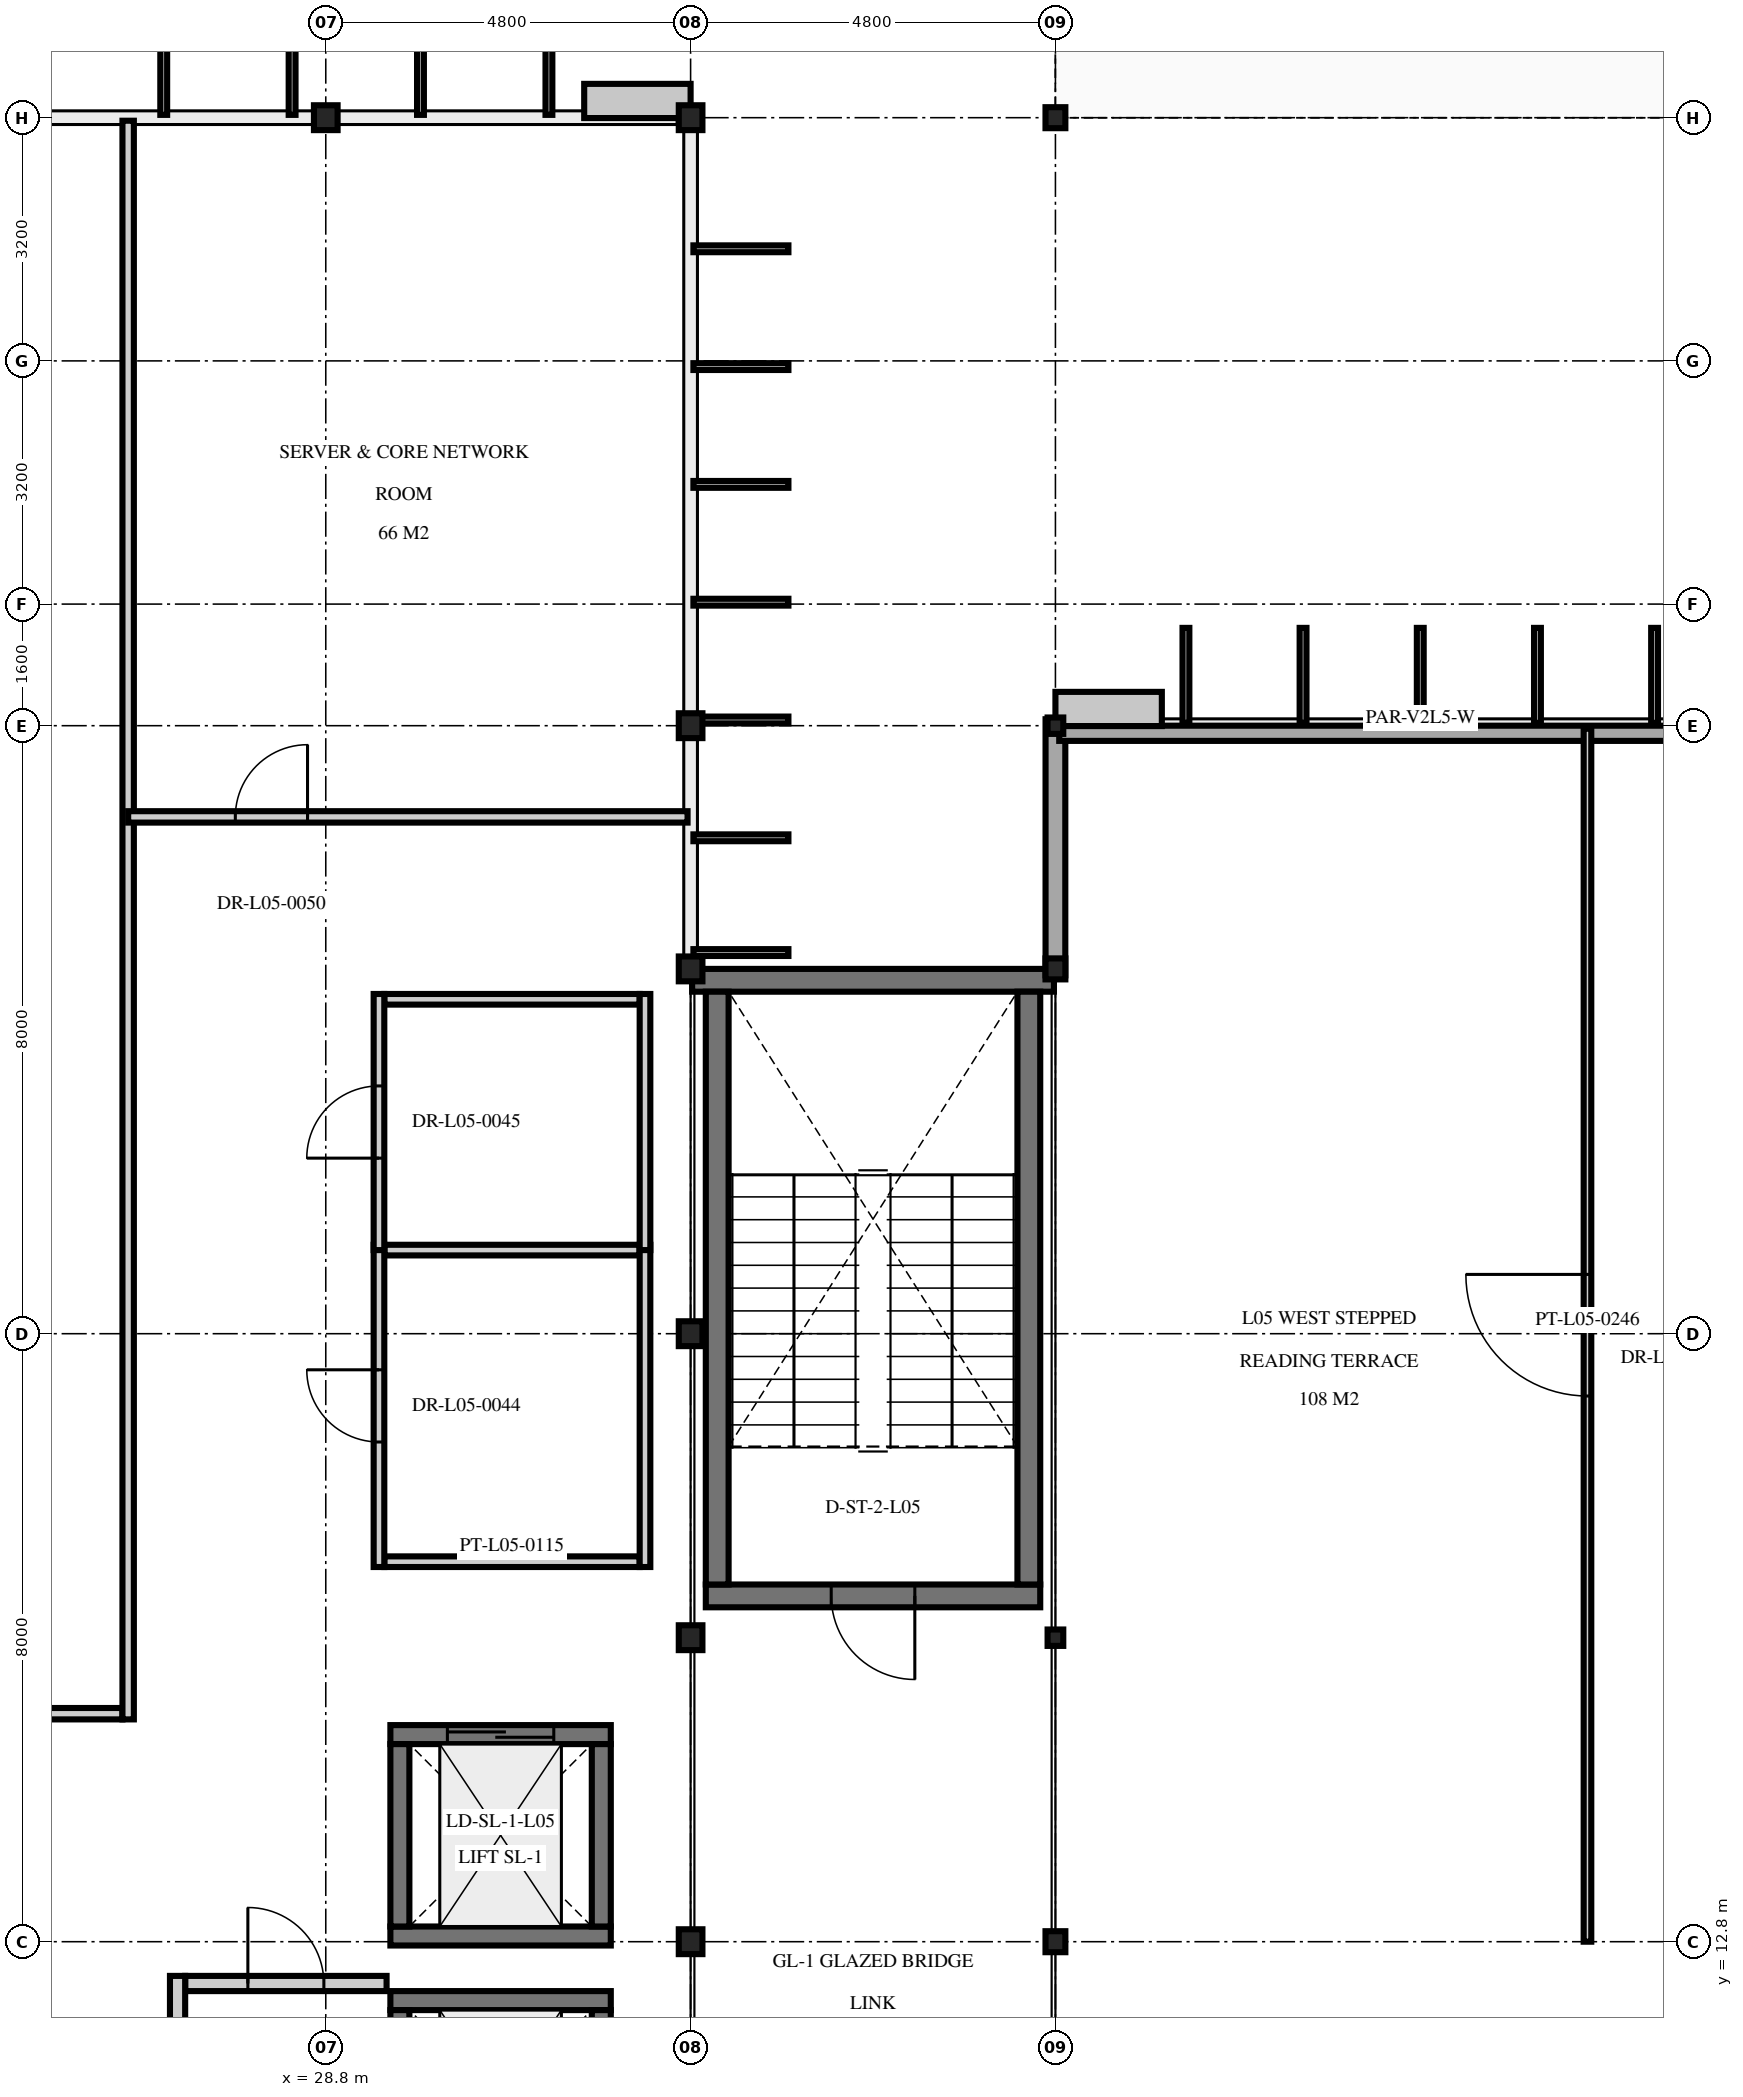
"""IFC4 building model, lengths in metres.
Left out: names, types, materials, properties, quantities, classifications, styles, units other than length and angle.
Written with IfcOpenShell. Run it as: python <this file> out.ifc"""

import sys

from ifc_helpers import new_model, si_unit, direction, frame, frame_2d, origin, origin_2d, place, context, subcontext, project, spatial, rectangle, i_section, extrude, element, fill, save


model = new_model("IFC4")
c1 = context("Model", 3, precision=1e-05, world=origin(), true_north=direction((0.0, 1.0)))
c2 = subcontext(c1, "Body", "Model", "MODEL_VIEW")
j1 = project(units=[si_unit("LENGTHUNIT", "METRE"), si_unit("PLANEANGLEUNIT", "RADIAN")], contexts=[c1])
p1 = place(None, origin())
s1 = spatial("IfcSite", under=j1, at=p1, CompositionType="ELEMENT")
p2 = place(p1, origin())
s2 = spatial("IfcBuilding", under=s1, at=p2, CompositionType="ELEMENT")
p3 = place(p2, frame((0.0, 0.0, 23.1)))
s3 = spatial("IfcBuildingStorey", under=s2, at=p3, CompositionType="ELEMENT", Elevation=23.1)
for number, where, z_axis, x_axis in (
    (1, (28.8, 36.8, 0.0), (0.0, 0.0, 1.0), (1.0, 0.0, 0.0)),
    (2, (33.6, 36.8, 0.0), (0.0, 0.0, 1.0), (1.0, 0.0, 0.0)),
    (3, (33.6, 12.8, 0.0), (0.0, 0.0, 1.0), (1.0, 0.0, 0.0)),
    (4, (33.6, 16.8, 0.0), (0.0, 0.0, 1.0), (1.0, 0.0, 0.0)),
    (5, (33.6, 20.8, 0.0), (0.0, 0.0, 1.0), (1.0, 0.0, 0.0)),
    (6, (33.6, 25.6, 0.0), (0.0, 0.0, 1.0), (1.0, 0.0, 0.0)),
    (7, (33.6, 28.8, 0.0), (0.0, 0.0, 1.0), (1.0, 0.0, 0.0)),
):
    element("IfcColumn", number, at=place(p3, frame(where, z_axis=z_axis, x_axis=x_axis)), inside=s3, PredefinedType="COLUMN", context=c2, shape_type="SweptSolid", body=[
        extrude(i_section(OverallWidth=0.311, OverallDepth=0.327, WebThickness=0.016, FlangeThickness=0.025, at=origin_2d()), origin(), (0.0, 0.0, 1.0), 4.5),
    ])
for number, where, z_axis, x_axis in (
    (8, (38.4, 12.8, 0.0), (0.0, 0.0, 1.0), (1.0, 0.0, 0.0)),
    (9, (38.4, 25.6, 0.0), (0.0, 0.0, 1.0), (1.0, 0.0, 0.0)),
):
    element("IfcColumn", number, at=place(p3, frame(where, z_axis=z_axis, x_axis=x_axis)), inside=s3, PredefinedType="COLUMN", context=c2, shape_type="SweptSolid", body=[
        extrude(i_section(OverallWidth=0.261, OverallDepth=0.276, WebThickness=0.015, FlangeThickness=0.025, at=origin_2d()), origin(), (0.0, 0.0, 1.0), 4.5),
    ])
p4 = place(p3, frame((38.4, 36.8, 0.0), z_axis=(0.0, 0.0, 1.0), x_axis=(1.0, 0.0, 0.0)))
e10 = element("IfcColumn", 10, at=p4, inside=s3, PredefinedType="COLUMN", context=c2, shape_type="SweptSolid", body=[
    extrude(i_section(OverallWidth=0.261, OverallDepth=0.276, WebThickness=0.015, FlangeThickness=0.025, at=origin_2d()), origin(), (0.0, 0.0, 1.0), 4.31),
])
for number, where, z_axis, x_axis in (
    (11, (38.4, 28.8, 0.0), (0.0, 0.0, 1.0), (1.0, 0.0, 0.0)),
    (12, (38.4, 16.8, 0.0), (0.0, 0.0, 1.0), (1.0, 0.0, 0.0)),
):
    element("IfcColumn", number, at=place(p3, frame(where, z_axis=z_axis, x_axis=x_axis)), inside=s3, PredefinedType="COLUMN", context=c2, shape_type="SweptSolid", body=[
        extrude(i_section(OverallWidth=0.206, OverallDepth=0.216, WebThickness=0.01, FlangeThickness=0.017, at=origin_2d()), origin(), (0.0, 0.0, 1.0), 4.5),
    ])
p5 = place(p3, frame((38.2, 17.35, 0.0), z_axis=(0.0, 0.0, 1.0), x_axis=(-1.0, 0.0, 0.0)))
e13 = element("IfcWall", 13, at=p5, inside=s3, PredefinedType="SHEAR", context=c2, shape_type="SweptSolid", body=[
    extrude(rectangle(XDim=4.4, YDim=0.3, at=frame_2d((2.2, 0.0))), origin(), (0.0, 0.0, 1.0), 4.29),
])
p6 = place(p5, frame((1.65, 0.0, 0.0)))
e14 = element("IfcOpeningElement", 14, at=p6, cuts=e13, PredefinedType="OPENING", context=c2, shape_type="SweptSolid", body=[
    extrude(rectangle(XDim=1.1, YDim=2.2, at=frame_2d((0.55, 1.1))), frame((0.0, 0.16, 0.0), z_axis=(0.0, -1.0, 0.0), x_axis=(1.0, 0.0, 0.0)), (0.0, 0.0, 1.0), 0.32),
])
p7 = place(p3, frame((33.62, 25.45, 0.0), z_axis=(0.0, 0.0, 1.0), x_axis=(1.0, 0.0, 0.0)))
e15 = element("IfcWall", 15, at=p7, inside=s3, PredefinedType="SHEAR", context=c2, shape_type="SweptSolid", body=[
    extrude(rectangle(XDim=4.76, YDim=0.3, at=frame_2d((2.38, 0.0))), origin(), (0.0, 0.0, 1.0), 4.29),
])
for number, where, z_axis, x_axis in (
    (16, (33.95, 17.5, 0.0), (0.0, 0.0, 1.0), (0.0, 1.0, 0.0)),
    (17, (38.05, 25.3, 0.0), (0.0, 0.0, 1.0), (0.0, -1.0, 0.0)),
):
    element("IfcWall", number, at=place(p3, frame(where, z_axis=z_axis, x_axis=x_axis)), inside=s3, PredefinedType="SHEAR", context=c2, shape_type="SweptSolid", body=[
        extrude(rectangle(XDim=7.8, YDim=0.3, at=frame_2d((3.9, 0.0))), origin(), (0.0, 0.0, 1.0), 4.29),
    ])
p8 = place(p3, frame((29.65, 12.025, 0.0), z_axis=(0.0, 0.0, 1.0), x_axis=(1.0, 0.0, 0.0)))
e18 = element("IfcWall", 18, at=p8, inside=s3, PredefinedType="SHEAR", context=c2, shape_type="SweptSolid", body=[
    extrude(rectangle(XDim=2.9, YDim=0.25, at=frame_2d((1.45, 0.0))), origin(), (0.0, 0.0, 1.0), 4.29),
])
p9 = place(p3, frame((29.775, 9.5, 0.0), z_axis=(0.0, 0.0, 1.0), x_axis=(0.0, 1.0, 0.0)))
e19 = element("IfcWall", 19, at=p9, inside=s3, PredefinedType="SHEAR", context=c2, shape_type="SweptSolid", body=[
    extrude(rectangle(XDim=2.4, YDim=0.25, at=frame_2d((1.2, 0.0))), origin(), (0.0, 0.0, 1.0), 4.29),
])
p10 = place(p9, frame((0.5, 0.0, 0.0)))
e20 = element("IfcOpeningElement", 20, at=p10, cuts=e19, PredefinedType="OPENING", context=c2, shape_type="SweptSolid", body=[
    extrude(rectangle(XDim=1.4, YDim=2.2, at=frame_2d((0.7, 1.1))), frame((0.0, 0.135, 0.0), z_axis=(0.0, -1.0, 0.0), x_axis=(1.0, 0.0, 0.0)), (0.0, 0.0, 1.0), 0.27),
])
p11 = place(p3, frame((32.425, 11.9, 0.0), z_axis=(0.0, 0.0, 1.0), x_axis=(0.0, -1.0, 0.0)))
e21 = element("IfcWall", 21, at=p11, inside=s3, PredefinedType="SHEAR", context=c2, shape_type="SweptSolid", body=[
    extrude(rectangle(XDim=2.4, YDim=0.25, at=frame_2d((1.2, 0.0))), origin(), (0.0, 0.0, 1.0), 4.29),
])
p12 = place(p3, frame((32.55, 12.875, 0.0), z_axis=(0.0, 0.0, 1.0), x_axis=(-1.0, 0.0, 0.0)))
e22 = element("IfcWall", 22, at=p12, inside=s3, PredefinedType="SHEAR", context=c2, shape_type="SweptSolid", body=[
    extrude(rectangle(XDim=2.9, YDim=0.25, at=frame_2d((1.45, 0.0))), origin(), (0.0, 0.0, 1.0), 4.29),
])
p13 = place(p3, frame((29.65, 15.525, 0.0), z_axis=(0.0, 0.0, 1.0), x_axis=(1.0, 0.0, 0.0)))
e23 = element("IfcWall", 23, at=p13, inside=s3, PredefinedType="SHEAR", context=c2, shape_type="SweptSolid", body=[
    extrude(rectangle(XDim=2.9, YDim=0.25, at=frame_2d((1.45, 0.0))), origin(), (0.0, 0.0, 1.0), 4.29),
])
p14 = place(p13, frame((0.75, 0.0, 0.0)))
e24 = element("IfcOpeningElement", 24, at=p14, cuts=e23, PredefinedType="OPENING", context=c2, shape_type="SweptSolid", body=[
    extrude(rectangle(XDim=1.4, YDim=2.2, at=frame_2d((0.7, 1.1))), frame((0.0, 0.135, 0.0), z_axis=(0.0, -1.0, 0.0), x_axis=(1.0, 0.0, 0.0)), (0.0, 0.0, 1.0), 0.27),
])
for number, where, z_axis, x_axis in (
    (25, (29.775, 13.0, 0.0), (0.0, 0.0, 1.0), (0.0, 1.0, 0.0)),
    (26, (32.425, 15.4, 0.0), (0.0, 0.0, 1.0), (0.0, -1.0, 0.0)),
):
    element("IfcWall", number, at=place(p3, frame(where, z_axis=z_axis, x_axis=x_axis)), inside=s3, PredefinedType="SHEAR", context=c2, shape_type="SweptSolid", body=[
        extrude(rectangle(XDim=2.4, YDim=0.25, at=frame_2d((1.2, 0.0))), origin(), (0.0, 0.0, 1.0), 4.29),
    ])
p15 = place(p3, frame((38.4, 25.515, 0.0), z_axis=(0.0, 0.0, 1.0), x_axis=(0.0, 1.0, 0.0)))
e27 = element("IfcWall", 27, at=p15, inside=s3, PredefinedType="SOLIDWALL", context=c2, shape_type="SweptSolid", body=[
    extrude(rectangle(XDim=3.37, YDim=0.26, at=frame_2d((1.685, 0.0))), origin(), (0.0, 0.0, 1.0), 3.859),
])
p16 = place(p3, frame((38.45, 28.7, 0.0), z_axis=(0.0, 0.0, 1.0), x_axis=(1.0, 0.0, 0.0)))
e28 = element("IfcWall", 28, at=p16, inside=s3, PredefinedType="PARAPET", context=c2, shape_type="SweptSolid", body=[
    extrude(rectangle(XDim=9.5, YDim=0.2, at=frame_2d((4.75, 0.0))), origin(), (0.0, 0.0, 1.0), 1.1),
])
p17 = place(p3, frame((26.95, 12.25, 0.0), z_axis=(0.0, 0.0, 1.0), x_axis=(1.0, 0.0, 0.0)))
e29 = element("IfcWall", 29, at=p17, inside=s3, PredefinedType="PARTITIONING", context=c2, shape_type="SweptSolid", body=[
    extrude(rectangle(XDim=2.65, YDim=0.2, at=frame_2d((1.325, 0.0))), origin(), (0.0, 0.0, 1.0), 4.29),
])
p18 = place(p17, frame((0.825, 0.0, 0.0)))
e30 = element("IfcOpeningElement", 30, at=p18, cuts=e29, PredefinedType="OPENING", context=c2, shape_type="SweptSolid", body=[
    extrude(rectangle(XDim=1.0, YDim=2.2, at=frame_2d((0.5, 1.1))), frame((0.0, 0.11, 0.0), z_axis=(0.0, -1.0, 0.0), x_axis=(1.0, 0.0, 0.0)), (0.0, 0.0, 1.0), 0.22),
])
p19 = place(p3, frame((26.85, 9.25, 0.0), z_axis=(0.0, 0.0, 1.0), x_axis=(0.0, 1.0, 0.0)))
e31 = element("IfcWall", 31, at=p19, inside=s3, PredefinedType="PARTITIONING", context=c2, shape_type="SweptSolid", body=[
    extrude(rectangle(XDim=3.1, YDim=0.2, at=frame_2d((1.55, 0.0))), origin(), (0.0, 0.0, 1.0), 4.29),
])
for number, where, z_axis, x_axis in (
    (32, (29.57, 17.8, 0.0), (0.0, 0.0, 1.0), (1.0, 0.0, 0.0)),
    (33, (29.57, 21.9, 0.0), (0.0, 0.0, 1.0), (1.0, 0.0, 0.0)),
):
    element("IfcWall", number, at=place(p3, frame(where, z_axis=z_axis, x_axis=x_axis)), inside=s3, PredefinedType="PARTITIONING", context=c2, shape_type="SweptSolid", body=[
        extrude(rectangle(XDim=3.36, YDim=0.14, at=frame_2d((1.68, 0.0))), origin(), (0.0, 0.0, 1.0), 3.995),
    ])
p20 = place(p3, frame((29.5, 17.73, 0.0), z_axis=(0.0, 0.0, 1.0), x_axis=(0.0, 1.0, 0.0)))
e34 = element("IfcWall", 34, at=p20, inside=s3, PredefinedType="PARTITIONING", context=c2, shape_type="SweptSolid", body=[
    extrude(rectangle(XDim=4.24, YDim=0.14, at=frame_2d((2.12, 0.0))), origin(), (0.0, 0.0, 1.0), 3.653),
])
p21 = place(p20, frame((1.645, 0.0, 0.0)))
e35 = element("IfcOpeningElement", 35, at=p21, cuts=e34, PredefinedType="OPENING", context=c2, shape_type="SweptSolid", body=[
    extrude(rectangle(XDim=0.95, YDim=2.1, at=frame_2d((0.475, 1.05))), frame((0.0, 0.08, 0.0), z_axis=(0.0, -1.0, 0.0), x_axis=(1.0, 0.0, 0.0)), (0.0, 0.0, 1.0), 0.16),
])
p22 = place(p3, frame((33.0, 17.73, 0.0), z_axis=(0.0, 0.0, 1.0), x_axis=(0.0, 1.0, 0.0)))
e36 = element("IfcWall", 36, at=p22, inside=s3, PredefinedType="PARTITIONING", context=c2, shape_type="SweptSolid", body=[
    extrude(rectangle(XDim=4.24, YDim=0.14, at=frame_2d((2.12, 0.0))), origin(), (0.0, 0.0, 1.0), 3.653),
])
p23 = place(p3, frame((29.57, 25.2, 0.0), z_axis=(0.0, 0.0, 1.0), x_axis=(1.0, 0.0, 0.0)))
e37 = element("IfcWall", 37, at=p23, inside=s3, PredefinedType="PARTITIONING", context=c2, shape_type="SweptSolid", body=[
    extrude(rectangle(XDim=3.36, YDim=0.14, at=frame_2d((1.68, 0.0))), origin(), (0.0, 0.0, 1.0), 3.995),
])
p24 = place(p3, frame((29.5, 21.9, 0.0), z_axis=(0.0, 0.0, 1.0), x_axis=(0.0, 1.0, 0.0)))
e38 = element("IfcWall", 38, at=p24, inside=s3, PredefinedType="PARTITIONING", context=c2, shape_type="SweptSolid", body=[
    extrude(rectangle(XDim=3.37, YDim=0.14, at=frame_2d((1.685, 0.0))), origin(), (0.0, 0.0, 1.0), 4.29),
])
p25 = place(p24, frame((1.21, 0.0, 0.0)))
e39 = element("IfcOpeningElement", 39, at=p25, cuts=e38, PredefinedType="OPENING", context=c2, shape_type="SweptSolid", body=[
    extrude(rectangle(XDim=0.95, YDim=2.1, at=frame_2d((0.475, 1.05))), frame((0.0, 0.08, 0.0), z_axis=(0.0, -1.0, 0.0), x_axis=(1.0, 0.0, 0.0)), (0.0, 0.0, 1.0), 0.16),
])
p26 = place(p3, frame((33.0, 21.9, 0.0), z_axis=(0.0, 0.0, 1.0), x_axis=(0.0, 1.0, 0.0)))
e40 = element("IfcWall", 40, at=p26, inside=s3, PredefinedType="PARTITIONING", context=c2, shape_type="SweptSolid", body=[
    extrude(rectangle(XDim=3.37, YDim=0.14, at=frame_2d((1.685, 0.0))), origin(), (0.0, 0.0, 1.0), 4.29),
])
p27 = place(p3, frame((9.675, 15.8, 0.0), z_axis=(0.0, 0.0, 1.0), x_axis=(1.0, 0.0, 0.0)))
e41 = element("IfcWall", 41, at=p27, inside=s3, PredefinedType="PARTITIONING", context=c2, shape_type="SweptSolid", body=[
    extrude(rectangle(XDim=16.45, YDim=0.15, at=frame_2d((8.225, 0.0))), origin(), (0.0, 0.0, 1.0), 3.662),
])
p28 = place(p3, frame((26.2, 15.725, 0.0), z_axis=(0.0, 0.0, 1.0), x_axis=(0.0, 1.0, 0.0)))
e42 = element("IfcWall", 42, at=p28, inside=s3, PredefinedType="PARTITIONING", context=c2, shape_type="SweptSolid", body=[
    extrude(rectangle(XDim=21.035, YDim=0.15, at=frame_2d((10.518, 0.0))), origin(), (0.0, 0.0, 1.0), 3.653),
])
p29 = place(p3, frame((26.2, 27.6, 0.0), z_axis=(0.0, 0.0, 1.0), x_axis=(1.0, 0.0, 0.0)))
e43 = element("IfcWall", 43, at=p29, inside=s3, PredefinedType="PARTITIONING", context=c2, shape_type="SweptSolid", body=[
    extrude(rectangle(XDim=7.36, YDim=0.15, at=frame_2d((3.68, 0.0))), origin(), (0.0, 0.0, 1.0), 3.662),
])
p30 = place(p29, frame((1.41, 0.0, 0.0)))
e44 = element("IfcOpeningElement", 44, at=p30, cuts=e43, PredefinedType="OPENING", context=c2, shape_type="SweptSolid", body=[
    extrude(rectangle(XDim=0.95, YDim=2.15, at=frame_2d((0.475, 1.075))), frame((0.0, 0.085, 0.0), z_axis=(0.0, -1.0, 0.0), x_axis=(1.0, 0.0, 0.0)), (0.0, 0.0, 1.0), 0.17),
])
p31 = place(p3, frame((45.4, 12.8, 0.0), z_axis=(0.0, 0.0, 1.0), x_axis=(0.0, 1.0, 0.0)))
e45 = element("IfcWall", 45, at=p31, inside=s3, PredefinedType="MOVABLE", context=c2, shape_type="SweptSolid", body=[
    extrude(rectangle(XDim=15.96, YDim=0.1, at=frame_2d((7.98, 0.0))), origin(), (0.0, 0.0, 1.0), 10.666),
])
p32 = place(p31, frame((7.18, 0.0, 0.0)))
e46 = element("IfcOpeningElement", 46, at=p32, cuts=e45, PredefinedType="OPENING", context=c2, shape_type="SweptSolid", body=[
    extrude(rectangle(XDim=1.6, YDim=2.25, at=frame_2d((0.8, 1.125))), frame((0.0, 0.06, 0.0), z_axis=(0.0, -1.0, 0.0), x_axis=(1.0, 0.0, 0.0)), (0.0, 0.0, 1.0), 0.12),
])
p33 = place(p6, origin())
e47 = element("IfcDoor", 47, at=p33, inside=s3, OperationType="SINGLE_SWING_LEFT", PredefinedType="DOOR", context=c2, shape_type="SweptSolid", body=[
    extrude(rectangle(XDim=1.1, YDim=2.2, at=frame_2d((0.55, 1.1))), frame((0.0, 0.025, 0.0), z_axis=(0.0, -1.0, 0.0), x_axis=(1.0, 0.0, 0.0)), (0.0, 0.0, 1.0), 0.05),
])
fill(e14, e47)
p34 = place(p14, origin())
e48 = element("IfcDoor", 48, at=p34, inside=s3, OperationType="DOUBLE_DOOR_SLIDING", PredefinedType="DOOR", context=c2, shape_type="SweptSolid", body=[
    extrude(rectangle(XDim=1.4, YDim=2.2, at=frame_2d((0.7, 1.1))), frame((0.0, 0.025, 0.0), z_axis=(0.0, -1.0, 0.0), x_axis=(1.0, 0.0, 0.0)), (0.0, 0.0, 1.0), 0.05),
])
fill(e24, e48)
p35 = place(p18, origin())
e49 = element("IfcDoor", 49, at=p35, inside=s3, OperationType="SINGLE_SWING_LEFT", PredefinedType="DOOR", context=c2, shape_type="SweptSolid", body=[
    extrude(rectangle(XDim=1.0, YDim=2.2, at=frame_2d((0.5, 1.1))), frame((0.0, 0.025, 0.0), z_axis=(0.0, -1.0, 0.0), x_axis=(1.0, 0.0, 0.0)), (0.0, 0.0, 1.0), 0.05),
])
fill(e30, e49)
p36 = place(p21, origin())
e50 = element("IfcDoor", 50, at=p36, inside=s3, OperationType="SINGLE_SWING_RIGHT", PredefinedType="DOOR", context=c2, shape_type="SweptSolid", body=[
    extrude(rectangle(XDim=0.95, YDim=2.1, at=frame_2d((0.475, 1.05))), frame((0.0, 0.025, 0.0), z_axis=(0.0, -1.0, 0.0), x_axis=(1.0, 0.0, 0.0)), (0.0, 0.0, 1.0), 0.05),
])
fill(e35, e50)
p37 = place(p25, origin())
e51 = element("IfcDoor", 51, at=p37, inside=s3, OperationType="SINGLE_SWING_LEFT", PredefinedType="DOOR", context=c2, shape_type="SweptSolid", body=[
    extrude(rectangle(XDim=0.95, YDim=2.1, at=frame_2d((0.475, 1.05))), frame((0.0, 0.025, 0.0), z_axis=(0.0, -1.0, 0.0), x_axis=(1.0, 0.0, 0.0)), (0.0, 0.0, 1.0), 0.05),
])
fill(e39, e51)
p38 = place(p30, origin())
e52 = element("IfcDoor", 52, at=p38, inside=s3, OperationType="SINGLE_SWING_RIGHT", PredefinedType="DOOR", context=c2, shape_type="SweptSolid", body=[
    extrude(rectangle(XDim=0.95, YDim=2.15, at=frame_2d((0.475, 1.075))), frame((0.0, 0.025, 0.0), z_axis=(0.0, -1.0, 0.0), x_axis=(1.0, 0.0, 0.0)), (0.0, 0.0, 1.0), 0.05),
])
fill(e44, e52)
p39 = place(p32, origin())
e53 = element("IfcDoor", 53, at=p39, inside=s3, OperationType="DOUBLE_DOOR_SINGLE_SWING", PredefinedType="DOOR", context=c2, shape_type="SweptSolid", body=[
    extrude(rectangle(XDim=1.6, YDim=2.25, at=frame_2d((0.8, 1.125))), frame((0.0, 0.025, 0.0), z_axis=(0.0, -1.0, 0.0), x_axis=(1.0, 0.0, 0.0)), (0.0, 0.0, 1.0), 0.05),
])
fill(e46, e53)
save(model, sys.argv[1])
